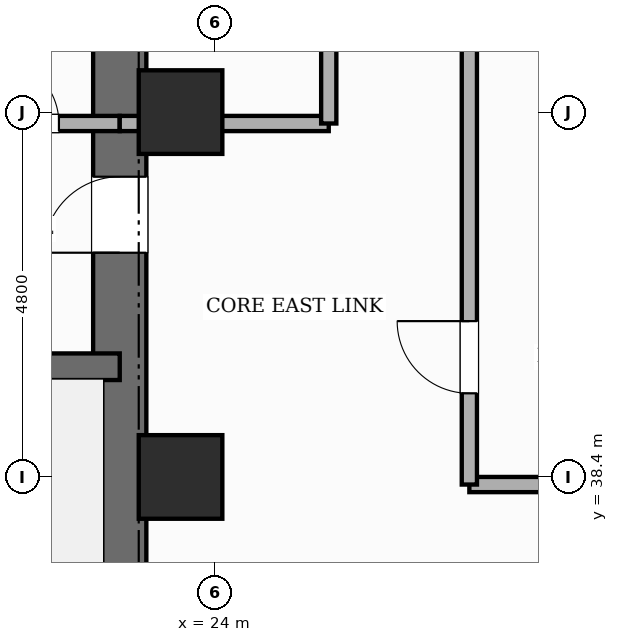
"""IFC4 building model, lengths in metres.
Left out: names, types, materials, properties, quantities, classifications, styles, units other than length and angle.
Written with IfcOpenShell. Run it as: python <this file> out.ifc"""

import sys

from ifc_helpers import new_model, si_unit, direction, frame, frame_2d, origin, origin_2d, place, context, subcontext, project, spatial, rectangle, extrude, element, fill, save


model = new_model("IFC4")
c1 = context("Model", 3, precision=1e-05, world=origin(), true_north=direction((0.0, 1.0)))
c2 = subcontext(c1, "Body", "Model", "MODEL_VIEW")
j1 = project(units=[si_unit("LENGTHUNIT", "METRE"), si_unit("PLANEANGLEUNIT", "RADIAN")], contexts=[c1])
p1 = place(None, origin())
s1 = spatial("IfcSite", under=j1, at=p1, CompositionType="ELEMENT")
p2 = place(p1, origin())
s2 = spatial("IfcBuilding", under=s1, at=p2, CompositionType="ELEMENT")
p3 = place(p2, frame((0.0, 0.0, 28.6)))
s3 = spatial("IfcBuildingStorey", under=s2, at=p3, CompositionType="ELEMENT", Elevation=28.6)
p4 = place(p3, frame((22.75, 30.55, 0.0), z_axis=(0.0, 0.0, 1.0), x_axis=(0.0, 1.0, 0.0)))
e1 = element("IfcWall", 1, at=p4, inside=s3, PredefinedType="SHEAR", context=c2, shape_type="SweptSolid", body=[
    extrude(rectangle(XDim=15.6, YDim=0.7, at=frame_2d((7.8, 0.0))), origin(), (0.0, 0.0, 1.0), 3.6),
])
p5 = place(p4, frame((10.8, 0.0, 0.0)))
e2 = element("IfcOpeningElement", 2, at=p5, cuts=e1, PredefinedType="OPENING", context=c2, shape_type="SweptSolid", body=[
    extrude(rectangle(XDim=1.0, YDim=2.15, at=frame_2d((0.5, 1.075))), frame((0.0, 0.36, 0.0), z_axis=(0.0, -1.0, 0.0), x_axis=(1.0, 0.0, 0.0)), (0.0, 0.0, 1.0), 0.72),
])
p6 = place(p3, frame((18.84, 39.85, 0.0), z_axis=(0.0, 0.0, 1.0), x_axis=(1.0, 0.0, 0.0)))
e3 = element("IfcWall", 3, at=p6, inside=s3, PredefinedType="SHEAR", context=c2, shape_type="SweptSolid", body=[
    extrude(rectangle(XDim=3.91, YDim=0.35, at=frame_2d((1.955, 0.0))), origin(), (0.0, 0.0, 1.0), 3.6),
])
for number, where, z_axis, x_axis in (
    (4, (23.55, 38.4, 0.0), (0.0, 0.0, 1.0), (1.0, 0.0, 0.0)),
    (5, (23.55, 43.2, 0.0), (0.0, 0.0, 1.0), (1.0, 0.0, 0.0)),
):
    element("IfcColumn", number, at=place(p3, frame(where, z_axis=z_axis, x_axis=x_axis)), inside=s3, PredefinedType="COLUMN", context=c2, shape_type="SweptSolid", body=[
        extrude(rectangle(XDim=1.1, YDim=1.1, at=origin_2d()), origin(), (0.0, 0.0, 1.0), 3.6),
    ])
p7 = place(p3, frame((18.84, 43.05, 0.0), z_axis=(0.0, 0.0, 1.0), x_axis=(1.0, 0.0, 0.0)))
e6 = element("IfcWall", 6, at=p7, inside=s3, PredefinedType="POLYGONAL", context=c2, shape_type="SweptSolid", body=[
    extrude(rectangle(XDim=3.91, YDim=0.2, at=frame_2d((1.955, 0.0))), origin(), (0.0, 0.0, 1.0), 2.53),
])
p8 = place(p7, frame((0.55, 0.0, 0.0)))
e7 = element("IfcOpeningElement", 7, at=p8, cuts=e6, PredefinedType="OPENING", context=c2, shape_type="SweptSolid", body=[
    extrude(rectangle(XDim=0.88, YDim=2.1, at=frame_2d((0.44, 1.05))), frame((0.0, 0.11, 0.0), z_axis=(0.0, -1.0, 0.0), x_axis=(1.0, 0.0, 0.0)), (0.0, 0.0, 1.0), 0.22),
])
p9 = place(p7, frame((2.25, 0.0, 0.0)))
e8 = element("IfcOpeningElement", 8, at=p9, cuts=e6, PredefinedType="OPENING", context=c2, shape_type="SweptSolid", body=[
    extrude(rectangle(XDim=0.86, YDim=2.1, at=frame_2d((0.43, 1.05))), frame((0.0, 0.11, 0.0), z_axis=(0.0, -1.0, 0.0), x_axis=(1.0, 0.0, 0.0)), (0.0, 0.0, 1.0), 0.22),
])
p10 = place(p3, frame((27.35, 38.3, 0.0), z_axis=(0.0, 0.0, 1.0), x_axis=(1.0, 0.0, 0.0)))
e9 = element("IfcWall", 9, at=p10, inside=s3, PredefinedType="PARTITIONING", context=c2, shape_type="SweptSolid", body=[
    extrude(rectangle(XDim=14.43, YDim=0.2, at=frame_2d((7.215, 0.0))), origin(), (0.0, 0.0, 1.0), 3.35),
])
p11 = place(p10, frame((2.97, 0.0, 0.0)))
e10 = element("IfcOpeningElement", 10, at=p11, cuts=e9, PredefinedType="OPENING", context=c2, shape_type="SweptSolid", body=[
    extrude(rectangle(XDim=0.98, YDim=2.18, at=frame_2d((0.49, 1.09))), frame((0.0, 0.11, 0.0), z_axis=(0.0, -1.0, 0.0), x_axis=(1.0, 0.0, 0.0)), (0.0, 0.0, 1.0), 0.22),
])
p12 = place(p10, frame((8.12, 0.0, 0.0)))
e11 = element("IfcOpeningElement", 11, at=p12, cuts=e9, PredefinedType="OPENING", context=c2, shape_type="SweptSolid", body=[
    extrude(rectangle(XDim=0.98, YDim=2.18, at=frame_2d((0.49, 1.09))), frame((0.0, 0.11, 0.0), z_axis=(0.0, -1.0, 0.0), x_axis=(1.0, 0.0, 0.0)), (0.0, 0.0, 1.0), 0.22),
])
p13 = place(p3, frame((27.35, 38.3, 0.0), z_axis=(0.0, 0.0, 1.0), x_axis=(0.0, 1.0, 0.0)))
e12 = element("IfcWall", 12, at=p13, inside=s3, PredefinedType="PARTITIONING", context=c2, shape_type="SweptSolid", body=[
    extrude(rectangle(XDim=9.38, YDim=0.2, at=frame_2d((4.69, 0.0))), origin(), (0.0, 0.0, 1.0), 3.35),
])
p14 = place(p13, frame((1.2, 0.0, 0.0)))
e13 = element("IfcOpeningElement", 13, at=p14, cuts=e12, PredefinedType="OPENING", context=c2, shape_type="SweptSolid", body=[
    extrude(rectangle(XDim=0.95, YDim=2.15, at=frame_2d((0.475, 1.075))), frame((0.0, 0.11, 0.0), z_axis=(0.0, -1.0, 0.0), x_axis=(1.0, 0.0, 0.0)), (0.0, 0.0, 1.0), 0.22),
])
p15 = place(p3, frame((22.75, 43.05, 0.0), z_axis=(0.0, 0.0, 1.0), x_axis=(1.0, 0.0, 0.0)))
e14 = element("IfcWall", 14, at=p15, inside=s3, PredefinedType="PARTITIONING", context=c2, shape_type="SweptSolid", body=[
    extrude(rectangle(XDim=2.75, YDim=0.2, at=frame_2d((1.375, 0.0))), origin(), (0.0, 0.0, 1.0), 2.53),
])
p16 = place(p3, frame((25.5, 43.05, 0.0), z_axis=(0.0, 0.0, 1.0), x_axis=(0.0, 1.0, 0.0)))
e15 = element("IfcWall", 15, at=p16, inside=s3, PredefinedType="PARTITIONING", context=c2, shape_type="SweptSolid", body=[
    extrude(rectangle(XDim=2.75, YDim=0.2, at=frame_2d((1.375, 0.0))), origin(), (0.0, 0.0, 1.0), 3.35),
])
p17 = place(p5, origin())
e16 = element("IfcDoor", 16, at=p17, inside=s3, OperationType="SINGLE_SWING_LEFT", PredefinedType="DOOR", context=c2, shape_type="SweptSolid", body=[
    extrude(rectangle(XDim=1.0, YDim=2.15, at=frame_2d((0.5, 1.075))), frame((0.0, 0.025, 0.0), z_axis=(0.0, -1.0, 0.0), x_axis=(1.0, 0.0, 0.0)), (0.0, 0.0, 1.0), 0.05),
])
fill(e2, e16)
p18 = place(p9, origin())
e17 = element("IfcDoor", 17, at=p18, inside=s3, OperationType="SINGLE_SWING_LEFT", PredefinedType="DOOR", context=c2, shape_type="SweptSolid", body=[
    extrude(rectangle(XDim=0.86, YDim=2.1, at=frame_2d((0.43, 1.05))), frame((0.0, 0.025, 0.0), z_axis=(0.0, -1.0, 0.0), x_axis=(1.0, 0.0, 0.0)), (0.0, 0.0, 1.0), 0.05),
])
fill(e8, e17)
p19 = place(p14, origin())
e18 = element("IfcDoor", 18, at=p19, inside=s3, OperationType="SINGLE_SWING_RIGHT", PredefinedType="DOOR", context=c2, shape_type="SweptSolid", body=[
    extrude(rectangle(XDim=0.95, YDim=2.15, at=frame_2d((0.475, 1.075))), frame((0.0, 0.025, 0.0), z_axis=(0.0, -1.0, 0.0), x_axis=(1.0, 0.0, 0.0)), (0.0, 0.0, 1.0), 0.05),
])
fill(e13, e18)
save(model, sys.argv[1])
